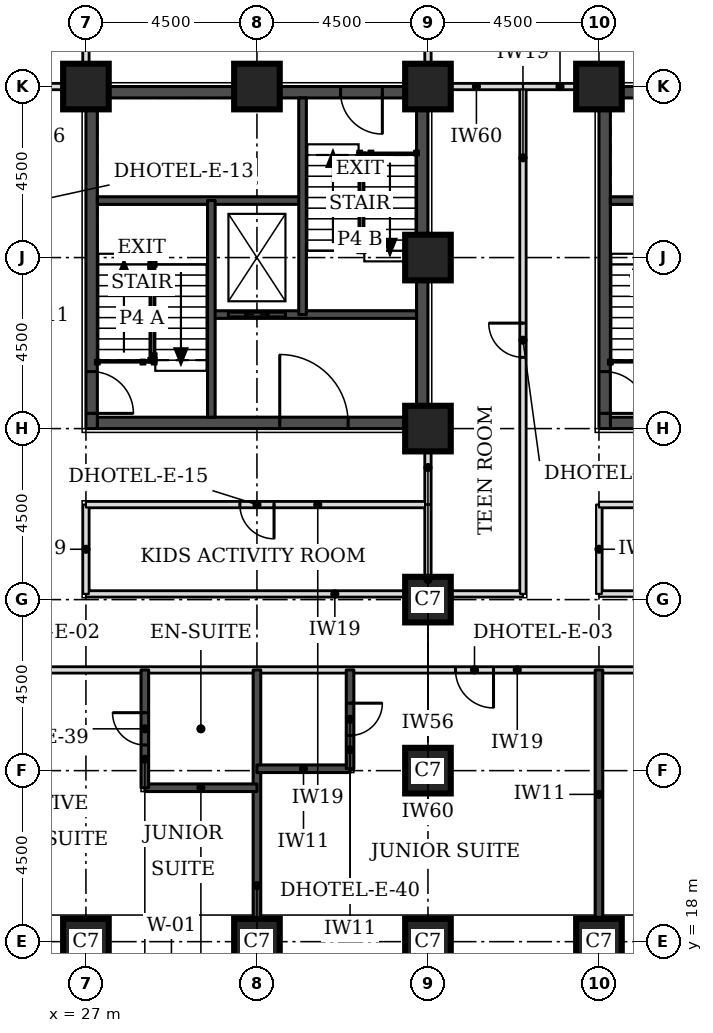
"""IFC4 building model, lengths in metres.
Left out: names, types, materials, properties, quantities, classifications, styles, units other than length and angle.
Written with IfcOpenShell. Run it as: python <this file> out.ifc"""

import sys

from ifc_helpers import new_model, si_unit, direction, frame, frame_2d, origin, origin_2d, place, context, subcontext, project, spatial, rectangle, extrude, element, fill, save


model = new_model("IFC4")
c1 = context("Model", 3, precision=1e-05, world=origin(), true_north=direction((0.0, 1.0)))
c2 = subcontext(c1, "Body", "Model", "MODEL_VIEW")
j1 = project(units=[si_unit("LENGTHUNIT", "METRE"), si_unit("PLANEANGLEUNIT", "RADIAN")], contexts=[c1])
p1 = place(None, origin())
s1 = spatial("IfcSite", under=j1, at=p1, CompositionType="ELEMENT")
p2 = place(p1, origin())
s2 = spatial("IfcBuilding", under=s1, at=p2, CompositionType="ELEMENT")
p3 = place(p2, frame((0.0, 0.0, 39.6)))
s3 = spatial("IfcBuildingStorey", under=s2, at=p3, CompositionType="ELEMENT", Elevation=39.6)
for number, where, z_axis, x_axis in (
    (1, (27.0, 18.0, 0.0), (0.0, 0.0, 1.0), (1.0, 0.0, 0.0)),
    (2, (31.5, 18.0, 0.0), (0.0, 0.0, 1.0), (1.0, 0.0, 0.0)),
    (3, (36.0, 18.0, 0.0), (0.0, 0.0, 1.0), (1.0, 0.0, 0.0)),
    (4, (40.5, 18.0, 0.0), (0.0, 0.0, 1.0), (1.0, 0.0, 0.0)),
    (5, (36.0, 22.5, 0.0), (0.0, 0.0, 1.0), (1.0, 0.0, 0.0)),
    (6, (36.0, 27.0, 0.0), (0.0, 0.0, 1.0), (1.0, 0.0, 0.0)),
    (7, (36.0, 31.5, 0.0), (0.0, 0.0, 1.0), (1.0, 0.0, 0.0)),
    (8, (36.0, 36.0, 0.0), (0.0, 0.0, 1.0), (1.0, 0.0, 0.0)),
    (9, (27.0, 40.5, 0.0), (0.0, 0.0, 1.0), (1.0, 0.0, 0.0)),
    (10, (31.5, 40.5, 0.0), (0.0, 0.0, 1.0), (1.0, 0.0, 0.0)),
    (11, (36.0, 40.5, 0.0), (0.0, 0.0, 1.0), (1.0, 0.0, 0.0)),
    (12, (40.5, 40.5, 0.0), (0.0, 0.0, 1.0), (1.0, 0.0, 0.0)),
):
    element("IfcColumn", number, at=place(p3, frame(where, z_axis=z_axis, x_axis=x_axis)), inside=s3, PredefinedType="COLUMN", context=c2, shape_type="SweptSolid", body=[
        extrude(rectangle(XDim=1.2, YDim=1.2, at=origin_2d()), origin(), (0.0, 0.0, 1.0), 3.3),
    ])
p4 = place(p3, frame((40.8, 31.65, 0.0), z_axis=(0.0, 0.0, 1.0), x_axis=(1.0, 0.0, 0.0)))
e13 = element("IfcWall", 13, at=p4, inside=s3, PredefinedType="SHEAR", context=c2, shape_type="SweptSolid", body=[
    extrude(rectangle(XDim=8.4, YDim=0.3, at=frame_2d((4.2, 0.0))), origin(), (0.0, 0.0, 1.0), 3.3),
])
p5 = place(p4, frame((5.2, 0.0, 0.0)))
e14 = element("IfcOpeningElement", 14, at=p5, cuts=e13, PredefinedType="OPENING", context=c2, shape_type="SweptSolid", body=[
    extrude(rectangle(XDim=1.0, YDim=2.1, at=frame_2d((0.5, 1.05))), frame((0.0, 0.16, 0.0), z_axis=(0.0, -1.0, 0.0), x_axis=(1.0, 0.0, 0.0)), (0.0, 0.0, 1.0), 0.32),
])
p6 = place(p3, frame((40.8, 40.35, 0.0), z_axis=(0.0, 0.0, 1.0), x_axis=(1.0, 0.0, 0.0)))
e15 = element("IfcWall", 15, at=p6, inside=s3, PredefinedType="SHEAR", context=c2, shape_type="SweptSolid", body=[
    extrude(rectangle(XDim=8.4, YDim=0.3, at=frame_2d((4.2, 0.0))), origin(), (0.0, 0.0, 1.0), 3.3),
])
p7 = place(p6, frame((6.4, 0.0, 0.0)))
e16 = element("IfcOpeningElement", 16, at=p7, cuts=e15, PredefinedType="OPENING", context=c2, shape_type="SweptSolid", body=[
    extrude(rectangle(XDim=1.1, YDim=2.1, at=frame_2d((0.55, 1.05))), frame((0.0, 0.16, 0.0), z_axis=(0.0, -1.0, 0.0), x_axis=(1.0, 0.0, 0.0)), (0.0, 0.0, 1.0), 0.32),
])
p8 = place(p3, frame((40.65, 31.5, 0.0), z_axis=(0.0, 0.0, 1.0), x_axis=(0.0, 1.0, 0.0)))
e17 = element("IfcWall", 17, at=p8, inside=s3, PredefinedType="SHEAR", context=c2, shape_type="SweptSolid", body=[
    extrude(rectangle(XDim=9.0, YDim=0.3, at=frame_2d((4.5, 0.0))), origin(), (0.0, 0.0, 1.0), 3.3),
])
p9 = place(p8, frame((0.4, 0.0, 0.0)))
e18 = element("IfcOpeningElement", 18, at=p9, cuts=e17, PredefinedType="OPENING", context=c2, shape_type="SweptSolid", body=[
    extrude(rectangle(XDim=1.1, YDim=2.1, at=frame_2d((0.55, 1.05))), frame((0.0, 0.16, 0.0), z_axis=(0.0, -1.0, 0.0), x_axis=(1.0, 0.0, 0.0)), (0.0, 0.0, 1.0), 0.32),
])
p10 = place(p3, frame((27.3, 31.65, 0.0), z_axis=(0.0, 0.0, 1.0), x_axis=(1.0, 0.0, 0.0)))
e19 = element("IfcWall", 19, at=p10, inside=s3, PredefinedType="SHEAR", context=c2, shape_type="SweptSolid", body=[
    extrude(rectangle(XDim=8.4, YDim=0.3, at=frame_2d((4.2, 0.0))), origin(), (0.0, 0.0, 1.0), 3.3),
])
p11 = place(p10, frame((4.8, 0.0, 0.0)))
e20 = element("IfcOpeningElement", 20, at=p11, cuts=e19, PredefinedType="OPENING", context=c2, shape_type="SweptSolid", body=[
    extrude(rectangle(XDim=1.8, YDim=2.1, at=frame_2d((0.9, 1.05))), frame((0.0, 0.16, 0.0), z_axis=(0.0, -1.0, 0.0), x_axis=(1.0, 0.0, 0.0)), (0.0, 0.0, 1.0), 0.32),
])
p12 = place(p3, frame((27.3, 40.35, 0.0), z_axis=(0.0, 0.0, 1.0), x_axis=(1.0, 0.0, 0.0)))
e21 = element("IfcWall", 21, at=p12, inside=s3, PredefinedType="SHEAR", context=c2, shape_type="SweptSolid", body=[
    extrude(rectangle(XDim=8.4, YDim=0.3, at=frame_2d((4.2, 0.0))), origin(), (0.0, 0.0, 1.0), 3.3),
])
p13 = place(p12, frame((6.4, 0.0, 0.0)))
e22 = element("IfcOpeningElement", 22, at=p13, cuts=e21, PredefinedType="OPENING", context=c2, shape_type="SweptSolid", body=[
    extrude(rectangle(XDim=1.1, YDim=2.1, at=frame_2d((0.55, 1.05))), frame((0.0, 0.16, 0.0), z_axis=(0.0, -1.0, 0.0), x_axis=(1.0, 0.0, 0.0)), (0.0, 0.0, 1.0), 0.32),
])
p14 = place(p3, frame((27.15, 31.5, 0.0), z_axis=(0.0, 0.0, 1.0), x_axis=(0.0, 1.0, 0.0)))
e23 = element("IfcWall", 23, at=p14, inside=s3, PredefinedType="SHEAR", context=c2, shape_type="SweptSolid", body=[
    extrude(rectangle(XDim=9.0, YDim=0.3, at=frame_2d((4.5, 0.0))), origin(), (0.0, 0.0, 1.0), 3.3),
])
p15 = place(p14, frame((0.4, 0.0, 0.0)))
e24 = element("IfcOpeningElement", 24, at=p15, cuts=e23, PredefinedType="OPENING", context=c2, shape_type="SweptSolid", body=[
    extrude(rectangle(XDim=1.1, YDim=2.1, at=frame_2d((0.55, 1.05))), frame((0.0, 0.16, 0.0), z_axis=(0.0, -1.0, 0.0), x_axis=(1.0, 0.0, 0.0)), (0.0, 0.0, 1.0), 0.32),
])
p16 = place(p3, frame((35.85, 31.5, 0.0), z_axis=(0.0, 0.0, 1.0), x_axis=(0.0, 1.0, 0.0)))
e25 = element("IfcWall", 25, at=p16, inside=s3, PredefinedType="SHEAR", context=c2, shape_type="SweptSolid", body=[
    extrude(rectangle(XDim=9.0, YDim=0.3, at=frame_2d((4.5, 0.0))), origin(), (0.0, 0.0, 1.0), 3.3),
])
p17 = place(p3, frame((20.65, 25.15, 0.0), z_axis=(0.0, 0.0, 1.0), x_axis=(1.0, 0.0, 0.0)))
e26 = element("IfcWall", 26, at=p17, inside=s3, PredefinedType="PARTITIONING", context=c2, shape_type="SweptSolid", body=[
    extrude(rectangle(XDim=32.2, YDim=0.15, at=frame_2d((16.1, 0.0))), origin(), (0.0, 0.0, 1.0), 3.08),
])
p18 = place(p17, frame((4.375, 0.0, 0.0)))
e27 = element("IfcOpeningElement", 27, at=p18, cuts=e26, PredefinedType="OPENING", context=c2, shape_type="SweptSolid", body=[
    extrude(rectangle(XDim=1.0, YDim=2.1, at=frame_2d((0.5, 1.05))), frame((0.0, 0.085, 0.0), z_axis=(0.0, -1.0, 0.0), x_axis=(1.0, 0.0, 0.0)), (0.0, 0.0, 1.0), 0.17),
])
p19 = place(p17, frame((16.075, 0.0, 0.0)))
e28 = element("IfcOpeningElement", 28, at=p19, cuts=e26, PredefinedType="OPENING", context=c2, shape_type="SweptSolid", body=[
    extrude(rectangle(XDim=1.0, YDim=2.1, at=frame_2d((0.5, 1.05))), frame((0.0, 0.085, 0.0), z_axis=(0.0, -1.0, 0.0), x_axis=(1.0, 0.0, 0.0)), (0.0, 0.0, 1.0), 0.17),
])
p20 = place(p17, frame((22.375, 0.0, 0.0)))
e29 = element("IfcOpeningElement", 29, at=p20, cuts=e26, PredefinedType="OPENING", context=c2, shape_type="SweptSolid", body=[
    extrude(rectangle(XDim=1.0, YDim=2.1, at=frame_2d((0.5, 1.05))), frame((0.0, 0.085, 0.0), z_axis=(0.0, -1.0, 0.0), x_axis=(1.0, 0.0, 0.0)), (0.0, 0.0, 1.0), 0.17),
])
p21 = place(p17, frame((0.425, 0.0, 0.0)))
e30 = element("IfcOpeningElement", 30, at=p21, cuts=e26, PredefinedType="OPENING", context=c2, shape_type="SweptSolid", body=[
    extrude(rectangle(XDim=1.0, YDim=2.1, at=frame_2d((0.5, 1.05))), frame((0.0, 0.085, 0.0), z_axis=(0.0, -1.0, 0.0), x_axis=(1.0, 0.0, 0.0)), (0.0, 0.0, 1.0), 0.17),
])
p22 = place(p17, frame((30.025, 0.0, 0.0)))
e31 = element("IfcOpeningElement", 31, at=p22, cuts=e26, PredefinedType="OPENING", context=c2, shape_type="SweptSolid", body=[
    extrude(rectangle(XDim=1.0, YDim=2.1, at=frame_2d((0.5, 1.05))), frame((0.0, 0.085, 0.0), z_axis=(0.0, -1.0, 0.0), x_axis=(1.0, 0.0, 0.0)), (0.0, 0.0, 1.0), 0.17),
])
p23 = place(p3, frame((27.0, 27.15, 0.0), z_axis=(0.0, 0.0, 1.0), x_axis=(1.0, 0.0, 0.0)))
e32 = element("IfcWall", 32, at=p23, inside=s3, PredefinedType="PARTITIONING", context=c2, shape_type="SweptSolid", body=[
    extrude(rectangle(XDim=11.5, YDim=0.15, at=frame_2d((5.75, 0.0))), origin(), (0.0, 0.0, 1.0), 3.08),
])
p24 = place(p3, frame((27.0, 27.15, 0.0), z_axis=(0.0, 0.0, 1.0), x_axis=(0.0, 1.0, 0.0)))
e33 = element("IfcWall", 33, at=p24, inside=s3, PredefinedType="PARTITIONING", context=c2, shape_type="SweptSolid", body=[
    extrude(rectangle(XDim=2.35, YDim=0.15, at=frame_2d((1.175, 0.0))), origin(), (0.0, 0.0, 1.0), 3.08),
])
p25 = place(p3, frame((38.5, 27.15, 0.0), z_axis=(0.0, 0.0, 1.0), x_axis=(0.0, 1.0, 0.0)))
e34 = element("IfcWall", 34, at=p25, inside=s3, PredefinedType="PARTITIONING", context=c2, shape_type="SweptSolid", body=[
    extrude(rectangle(XDim=13.35, YDim=0.15, at=frame_2d((6.675, 0.0))), origin(), (0.0, 0.0, 1.0), 3.08),
])
p26 = place(p25, frame((6.225, 0.0, 0.0)))
e35 = element("IfcOpeningElement", 35, at=p26, cuts=e34, PredefinedType="OPENING", context=c2, shape_type="SweptSolid", body=[
    extrude(rectangle(XDim=0.9, YDim=2.1, at=frame_2d((0.45, 1.05))), frame((0.0, 0.085, 0.0), z_axis=(0.0, -1.0, 0.0), x_axis=(1.0, 0.0, 0.0)), (0.0, 0.0, 1.0), 0.17),
])
p27 = place(p3, frame((40.5, 27.15, 0.0), z_axis=(0.0, 0.0, 1.0), x_axis=(1.0, 0.0, 0.0)))
e36 = element("IfcWall", 36, at=p27, inside=s3, PredefinedType="PARTITIONING", context=c2, shape_type="SweptSolid", body=[
    extrude(rectangle(XDim=10.35, YDim=0.15, at=frame_2d((5.175, 0.0))), origin(), (0.0, 0.0, 1.0), 3.08),
])
p28 = place(p3, frame((40.5, 27.15, 0.0), z_axis=(0.0, 0.0, 1.0), x_axis=(0.0, 1.0, 0.0)))
e37 = element("IfcWall", 37, at=p28, inside=s3, PredefinedType="PARTITIONING", context=c2, shape_type="SweptSolid", body=[
    extrude(rectangle(XDim=2.35, YDim=0.15, at=frame_2d((1.175, 0.0))), origin(), (0.0, 0.0, 1.0), 3.08),
])
p29 = place(p3, frame((27.0, 29.5, 0.0), z_axis=(0.0, 0.0, 1.0), x_axis=(1.0, 0.0, 0.0)))
e38 = element("IfcWall", 38, at=p29, inside=s3, PredefinedType="PARTITIONING", context=c2, shape_type="SweptSolid", body=[
    extrude(rectangle(XDim=9.0, YDim=0.15, at=frame_2d((4.5, 0.0))), origin(), (0.0, 0.0, 1.0), 3.08),
])
p30 = place(p29, frame((4.05, 0.0, 0.0)))
e39 = element("IfcOpeningElement", 39, at=p30, cuts=e38, PredefinedType="OPENING", context=c2, shape_type="SweptSolid", body=[
    extrude(rectangle(XDim=0.9, YDim=2.1, at=frame_2d((0.45, 1.05))), frame((0.0, 0.085, 0.0), z_axis=(0.0, -1.0, 0.0), x_axis=(1.0, 0.0, 0.0)), (0.0, 0.0, 1.0), 0.17),
])
p31 = place(p3, frame((36.0, 29.5, 0.0), z_axis=(0.0, 0.0, 1.0), x_axis=(0.0, 1.0, 0.0)))
e40 = element("IfcWall", 40, at=p31, inside=s3, PredefinedType="PARTITIONING", context=c2, shape_type="SweptSolid", body=[
    extrude(rectangle(XDim=1.95, YDim=0.15, at=frame_2d((0.975, 0.0))), origin(), (0.0, 0.0, 1.0), 2.33),
])
p32 = place(p3, frame((40.5, 29.5, 0.0), z_axis=(0.0, 0.0, 1.0), x_axis=(1.0, 0.0, 0.0)))
e41 = element("IfcWall", 41, at=p32, inside=s3, PredefinedType="PARTITIONING", context=c2, shape_type="SweptSolid", body=[
    extrude(rectangle(XDim=10.35, YDim=0.15, at=frame_2d((5.175, 0.0))), origin(), (0.0, 0.0, 1.0), 3.08),
])
p33 = place(p32, frame((4.725, 0.0, 0.0)))
e42 = element("IfcOpeningElement", 42, at=p33, cuts=e41, PredefinedType="OPENING", context=c2, shape_type="SweptSolid", body=[
    extrude(rectangle(XDim=0.9, YDim=2.1, at=frame_2d((0.45, 1.05))), frame((0.0, 0.085, 0.0), z_axis=(0.0, -1.0, 0.0), x_axis=(1.0, 0.0, 0.0)), (0.0, 0.0, 1.0), 0.17),
])
p34 = place(p3, frame((24.6, 40.5, 0.0), z_axis=(0.0, 0.0, 1.0), x_axis=(1.0, 0.0, 0.0)))
e43 = element("IfcWall", 43, at=p34, inside=s3, PredefinedType="PARTITIONING", context=c2, shape_type="SweptSolid", body=[
    extrude(rectangle(XDim=2.35, YDim=0.15, at=frame_2d((1.175, 0.0))), origin(), (0.0, 0.0, 1.0), 2.33),
])
p35 = place(p3, frame((38.5, 40.5, 0.0), z_axis=(0.0, 0.0, 1.0), x_axis=(1.0, 0.0, 0.0)))
e44 = element("IfcWall", 44, at=p35, inside=s3, PredefinedType="PARTITIONING", context=c2, shape_type="SweptSolid", body=[
    extrude(rectangle(XDim=1.95, YDim=0.15, at=frame_2d((0.975, 0.0))), origin(), (0.0, 0.0, 1.0), 2.33),
])
p36 = place(p3, frame((27.0, 40.55, 0.0), z_axis=(0.0, 0.0, 1.0), x_axis=(0.0, 1.0, 0.0)))
e45 = element("IfcWall", 45, at=p36, inside=s3, PredefinedType="PARTITIONING", context=c2, shape_type="SweptSolid", body=[
    extrude(rectangle(XDim=2.45, YDim=0.15, at=frame_2d((1.225, 0.0))), origin(), (0.0, 0.0, 1.0), 3.08),
])
p37 = place(p3, frame((36.0, 40.55, 0.0), z_axis=(0.0, 0.0, 1.0), x_axis=(0.0, 1.0, 0.0)))
e46 = element("IfcWall", 46, at=p37, inside=s3, PredefinedType="PARTITIONING", context=c2, shape_type="SweptSolid", body=[
    extrude(rectangle(XDim=4.4, YDim=0.15, at=frame_2d((2.2, 0.0))), origin(), (0.0, 0.0, 1.0), 2.33),
])
for number, where, z_axis, x_axis in (
    (47, (31.5, 18.6, 0.0), (0.0, 0.0, 1.0), (0.0, 1.0, 0.0)),
    (48, (40.5, 18.6, 0.0), (0.0, 0.0, 1.0), (0.0, 1.0, 0.0)),
):
    element("IfcWall", number, at=place(p3, frame(where, z_axis=z_axis, x_axis=x_axis)), inside=s3, PredefinedType="SOLIDWALL", context=c2, shape_type="SweptSolid", body=[
        extrude(rectangle(XDim=6.55, YDim=0.2, at=frame_2d((3.275, 0.0))), origin(), (0.0, 0.0, 1.0), 3.08),
    ])
p38 = place(p3, frame((28.55, 22.05, 0.0), z_axis=(0.0, 0.0, 1.0), x_axis=(1.0, 0.0, 0.0)))
e49 = element("IfcWall", 49, at=p38, inside=s3, PredefinedType="SOLIDWALL", context=c2, shape_type="SweptSolid", body=[
    extrude(rectangle(XDim=2.95, YDim=0.2, at=frame_2d((1.475, 0.0))), origin(), (0.0, 0.0, 1.0), 3.08),
])
p39 = place(p3, frame((28.55, 22.05, 0.0), z_axis=(0.0, 0.0, 1.0), x_axis=(0.0, 1.0, 0.0)))
e50 = element("IfcWall", 50, at=p39, inside=s3, PredefinedType="SOLIDWALL", context=c2, shape_type="SweptSolid", body=[
    extrude(rectangle(XDim=3.1, YDim=0.2, at=frame_2d((1.55, 0.0))), origin(), (0.0, 0.0, 1.0), 3.08),
])
p40 = place(p39, frame((1.125, 0.0, 0.0)))
e51 = element("IfcOpeningElement", 51, at=p40, cuts=e50, PredefinedType="OPENING", context=c2, shape_type="SweptSolid", body=[
    extrude(rectangle(XDim=0.85, YDim=2.1, at=frame_2d((0.425, 1.05))), frame((0.0, 0.11, 0.0), z_axis=(0.0, -1.0, 0.0), x_axis=(1.0, 0.0, 0.0)), (0.0, 0.0, 1.0), 0.22),
])
p41 = place(p3, frame((31.5, 22.55, 0.0), z_axis=(0.0, 0.0, 1.0), x_axis=(1.0, 0.0, 0.0)))
e52 = element("IfcWall", 52, at=p41, inside=s3, PredefinedType="SOLIDWALL", context=c2, shape_type="SweptSolid", body=[
    extrude(rectangle(XDim=2.45, YDim=0.2, at=frame_2d((1.225, 0.0))), origin(), (0.0, 0.0, 1.0), 3.08),
])
p42 = place(p3, frame((33.95, 22.55, 0.0), z_axis=(0.0, 0.0, 1.0), x_axis=(0.0, 1.0, 0.0)))
e53 = element("IfcWall", 53, at=p42, inside=s3, PredefinedType="SOLIDWALL", context=c2, shape_type="SweptSolid", body=[
    extrude(rectangle(XDim=2.6, YDim=0.2, at=frame_2d((1.3, 0.0))), origin(), (0.0, 0.0, 1.0), 3.08),
])
p43 = place(p42, frame((0.875, 0.0, 0.0)))
e54 = element("IfcOpeningElement", 54, at=p43, cuts=e53, PredefinedType="OPENING", context=c2, shape_type="SweptSolid", body=[
    extrude(rectangle(XDim=0.85, YDim=2.1, at=frame_2d((0.425, 1.05))), frame((0.0, 0.11, 0.0), z_axis=(0.0, -1.0, 0.0), x_axis=(1.0, 0.0, 0.0)), (0.0, 0.0, 1.0), 0.22),
])
p44 = place(p3, frame((36.0, 27.15, 0.0), z_axis=(0.0, 0.0, 1.0), x_axis=(0.0, 1.0, 0.0)))
e55 = element("IfcWall", 55, at=p44, inside=s3, PredefinedType="PARTITIONING", context=c2, shape_type="SweptSolid", body=[
    extrude(rectangle(XDim=2.35, YDim=0.15, at=frame_2d((1.175, 0.0))), origin(), (0.0, 0.0, 1.0), 2.33),
])
p45 = place(p3, frame((36.05, 40.5, 0.0), z_axis=(0.0, 0.0, 1.0), x_axis=(1.0, 0.0, 0.0)))
e56 = element("IfcWall", 56, at=p45, inside=s3, PredefinedType="PARTITIONING", context=c2, shape_type="SweptSolid", body=[
    extrude(rectangle(XDim=2.45, YDim=0.15, at=frame_2d((1.225, 0.0))), origin(), (0.0, 0.0, 1.0), 2.33),
])
p46 = place(p3, frame((40.8, 37.5, 0.0), z_axis=(0.0, 0.0, 1.0), x_axis=(1.0, 0.0, 0.0)))
e57 = element("IfcWall", 57, at=p46, inside=s3, PredefinedType="SOLIDWALL", context=c2, shape_type="SweptSolid", body=[
    extrude(rectangle(XDim=3.0, YDim=0.2, at=frame_2d((1.5, 0.0))), origin(), (0.0, 0.0, 1.0), 3.08),
])
p47 = place(p3, frame((30.3, 34.5, 0.0), z_axis=(0.0, 0.0, 1.0), x_axis=(1.0, 0.0, 0.0)))
e58 = element("IfcWall", 58, at=p47, inside=s3, PredefinedType="SOLIDWALL", context=c2, shape_type="SweptSolid", body=[
    extrude(rectangle(XDim=5.4, YDim=0.2, at=frame_2d((2.7, 0.0))), origin(), (0.0, 0.0, 1.0), 3.08),
])
p48 = place(p47, frame((0.45, 0.0, 0.0)))
e59 = element("IfcOpeningElement", 59, at=p48, cuts=e58, PredefinedType="OPENING", context=c2, shape_type="SweptSolid", body=[
    extrude(rectangle(XDim=1.5, YDim=2.1, at=frame_2d((0.75, 1.05))), frame((0.0, 0.11, 0.0), z_axis=(0.0, -1.0, 0.0), x_axis=(1.0, 0.0, 0.0)), (0.0, 0.0, 1.0), 0.22),
])
p49 = place(p3, frame((27.3, 37.5, 0.0), z_axis=(0.0, 0.0, 1.0), x_axis=(1.0, 0.0, 0.0)))
e60 = element("IfcWall", 60, at=p49, inside=s3, PredefinedType="SOLIDWALL", context=c2, shape_type="SweptSolid", body=[
    extrude(rectangle(XDim=5.4, YDim=0.2, at=frame_2d((2.7, 0.0))), origin(), (0.0, 0.0, 1.0), 3.08),
])
for number, where, z_axis, x_axis in (
    (61, (30.3, 31.8, 0.0), (0.0, 0.0, 1.0), (0.0, 1.0, 0.0)),
    (62, (32.7, 34.5, 0.0), (0.0, 0.0, 1.0), (0.0, 1.0, 0.0)),
):
    element("IfcWall", number, at=place(p3, frame(where, z_axis=z_axis, x_axis=x_axis)), inside=s3, PredefinedType="SOLIDWALL", context=c2, shape_type="SweptSolid", body=[
        extrude(rectangle(XDim=5.7, YDim=0.2, at=frame_2d((2.85, 0.0))), origin(), (0.0, 0.0, 1.0), 3.08),
    ])
p50 = place(p40, origin())
e63 = element("IfcDoor", 63, at=p50, inside=s3, OperationType="SINGLE_SWING_RIGHT", PredefinedType="DOOR", context=c2, shape_type="SweptSolid", body=[
    extrude(rectangle(XDim=0.85, YDim=2.1, at=frame_2d((0.425, 1.05))), frame((0.0, 0.025, 0.0), z_axis=(0.0, -1.0, 0.0), x_axis=(1.0, 0.0, 0.0)), (0.0, 0.0, 1.0), 0.05),
])
fill(e51, e63)
p51 = place(p19, frame((1.0, 0.0, 0.0), z_axis=(0.0, 0.0, 1.0), x_axis=(-1.0, 0.0, 0.0)))
e64 = element("IfcDoor", 64, at=p51, inside=s3, OperationType="SINGLE_SWING_LEFT", PredefinedType="DOOR", context=c2, shape_type="SweptSolid", body=[
    extrude(rectangle(XDim=1.0, YDim=2.1, at=frame_2d((0.5, 1.05))), frame((0.0, 0.025, 0.0), z_axis=(0.0, -1.0, 0.0), x_axis=(1.0, 0.0, 0.0)), (0.0, 0.0, 1.0), 0.05),
])
fill(e28, e64)
p52 = place(p43, frame((0.85, 0.0, 0.0), z_axis=(0.0, 0.0, 1.0), x_axis=(-1.0, 0.0, 0.0)))
e65 = element("IfcDoor", 65, at=p52, inside=s3, OperationType="SINGLE_SWING_LEFT", PredefinedType="DOOR", context=c2, shape_type="SweptSolid", body=[
    extrude(rectangle(XDim=0.85, YDim=2.1, at=frame_2d((0.425, 1.05))), frame((0.0, 0.025, 0.0), z_axis=(0.0, -1.0, 0.0), x_axis=(1.0, 0.0, 0.0)), (0.0, 0.0, 1.0), 0.05),
])
fill(e54, e65)
p53 = place(p30, frame((0.9, 0.0, 0.0), z_axis=(0.0, 0.0, 1.0), x_axis=(-1.0, 0.0, 0.0)))
e66 = element("IfcDoor", 66, at=p53, inside=s3, OperationType="SINGLE_SWING_LEFT", PredefinedType="DOOR", context=c2, shape_type="SweptSolid", body=[
    extrude(rectangle(XDim=0.9, YDim=2.1, at=frame_2d((0.45, 1.05))), frame((0.0, 0.025, 0.0), z_axis=(0.0, -1.0, 0.0), x_axis=(1.0, 0.0, 0.0)), (0.0, 0.0, 1.0), 0.05),
])
fill(e39, e66)
p54 = place(p26, origin())
e67 = element("IfcDoor", 67, at=p54, inside=s3, OperationType="SINGLE_SWING_RIGHT", PredefinedType="DOOR", context=c2, shape_type="SweptSolid", body=[
    extrude(rectangle(XDim=0.9, YDim=2.1, at=frame_2d((0.45, 1.05))), frame((0.0, 0.025, 0.0), z_axis=(0.0, -1.0, 0.0), x_axis=(1.0, 0.0, 0.0)), (0.0, 0.0, 1.0), 0.05),
])
fill(e35, e67)
p55 = place(p9, frame((1.1, 0.0, 0.0), z_axis=(0.0, 0.0, 1.0), x_axis=(-1.0, 0.0, 0.0)))
e68 = element("IfcDoor", 68, at=p55, inside=s3, OperationType="SINGLE_SWING_RIGHT", PredefinedType="DOOR", context=c2, shape_type="SweptSolid", body=[
    extrude(rectangle(XDim=1.1, YDim=2.1, at=frame_2d((0.55, 1.05))), frame((0.0, 0.025, 0.0), z_axis=(0.0, -1.0, 0.0), x_axis=(1.0, 0.0, 0.0)), (0.0, 0.0, 1.0), 0.05),
])
fill(e18, e68)
p56 = place(p15, frame((1.1, 0.0, 0.0), z_axis=(0.0, 0.0, 1.0), x_axis=(-1.0, 0.0, 0.0)))
e69 = element("IfcDoor", 69, at=p56, inside=s3, OperationType="SINGLE_SWING_RIGHT", PredefinedType="DOOR", context=c2, shape_type="SweptSolid", body=[
    extrude(rectangle(XDim=1.1, YDim=2.1, at=frame_2d((0.55, 1.05))), frame((0.0, 0.025, 0.0), z_axis=(0.0, -1.0, 0.0), x_axis=(1.0, 0.0, 0.0)), (0.0, 0.0, 1.0), 0.05),
])
fill(e24, e69)
p57 = place(p13, frame((1.1, 0.0, 0.0), z_axis=(0.0, 0.0, 1.0), x_axis=(-1.0, 0.0, 0.0)))
e70 = element("IfcDoor", 70, at=p57, inside=s3, OperationType="SINGLE_SWING_LEFT", PredefinedType="DOOR", context=c2, shape_type="SweptSolid", body=[
    extrude(rectangle(XDim=1.1, YDim=2.1, at=frame_2d((0.55, 1.05))), frame((0.0, 0.025, 0.0), z_axis=(0.0, -1.0, 0.0), x_axis=(1.0, 0.0, 0.0)), (0.0, 0.0, 1.0), 0.05),
])
fill(e22, e70)
p58 = place(p48, origin())
e71 = element("IfcDoor", 71, at=p58, inside=s3, OperationType="DOUBLE_DOOR_SLIDING", PredefinedType="DOOR", context=c2, shape_type="SweptSolid", body=[
    extrude(rectangle(XDim=1.5, YDim=2.1, at=frame_2d((0.75, 1.05))), frame((0.0, 0.025, 0.0), z_axis=(0.0, -1.0, 0.0), x_axis=(1.0, 0.0, 0.0)), (0.0, 0.0, 1.0), 0.05),
])
fill(e59, e71)
p59 = place(p11, origin())
e72 = element("IfcDoor", 72, at=p59, inside=s3, OperationType="SINGLE_SWING_LEFT", PredefinedType="DOOR", context=c2, shape_type="SweptSolid", body=[
    extrude(rectangle(XDim=1.8, YDim=2.1, at=frame_2d((0.9, 1.05))), frame((0.0, 0.025, 0.0), z_axis=(0.0, -1.0, 0.0), x_axis=(1.0, 0.0, 0.0)), (0.0, 0.0, 1.0), 0.05),
])
fill(e20, e72)
save(model, sys.argv[1])
